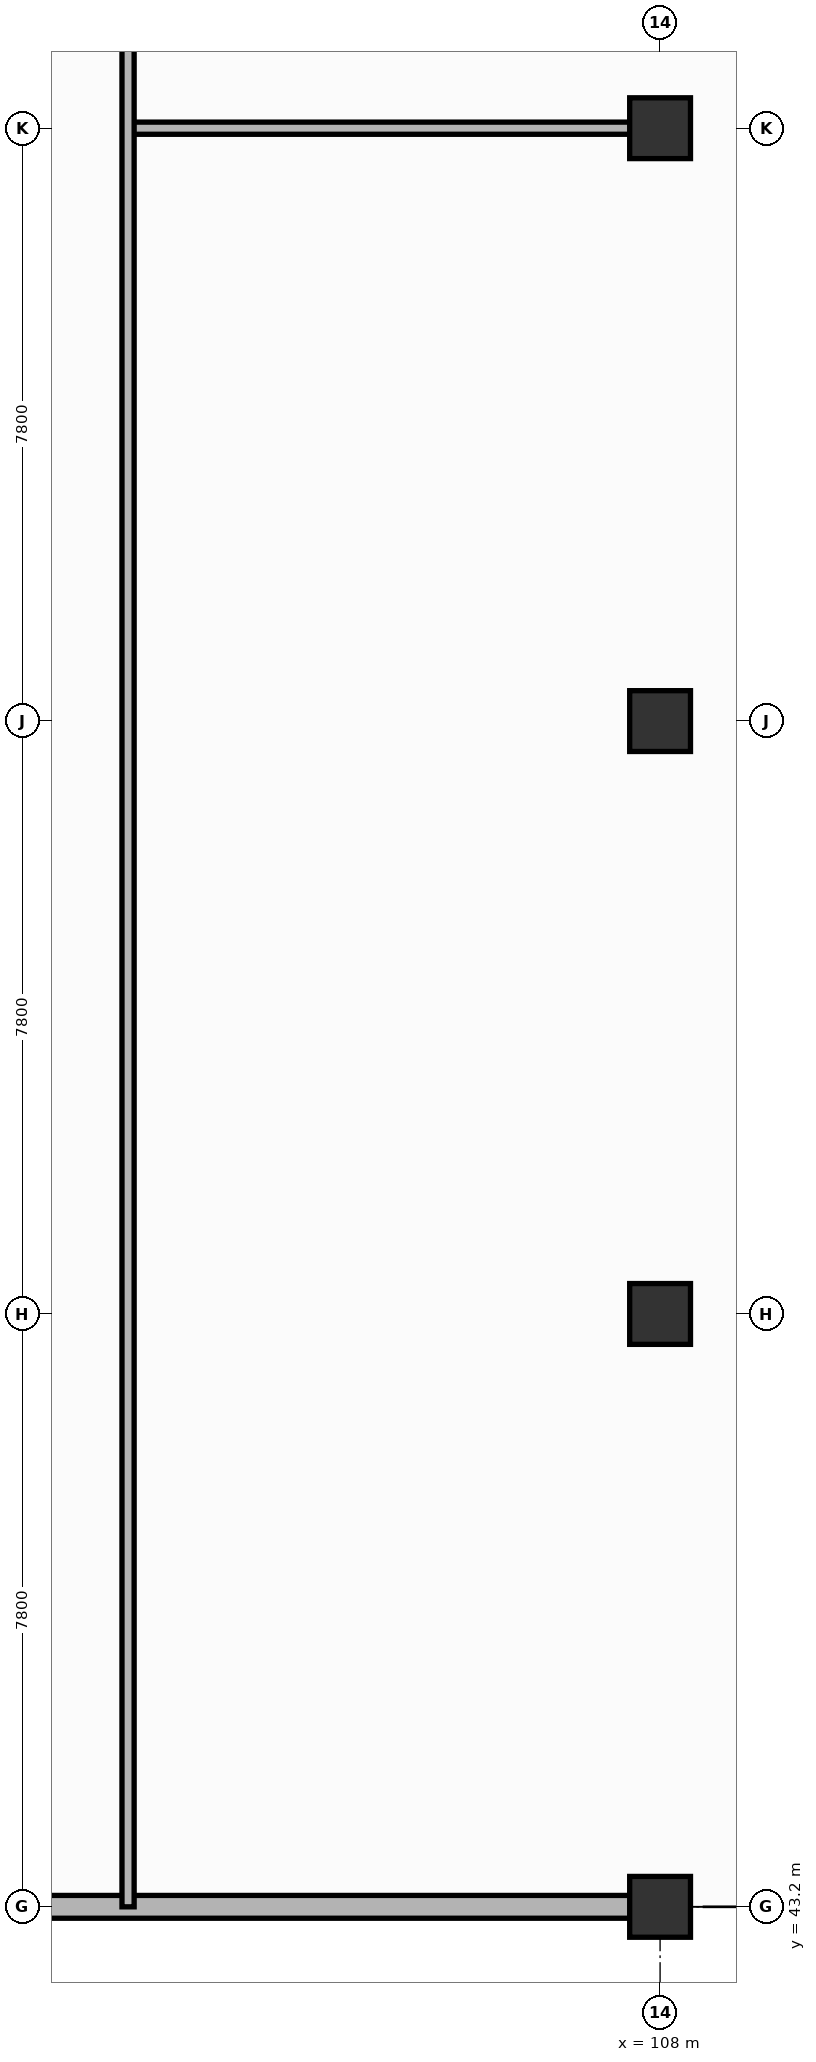
"""IFC4 building model, lengths in metres.
Left out: names, types, materials, properties, quantities, classifications, styles, units other than length and angle.
Written with IfcOpenShell. Run it as: python <this file> out.ifc"""

import sys

from ifc_helpers import new_model, si_unit, direction, frame, frame_2d, origin, origin_2d, place, context, subcontext, project, spatial, polyline, rectangle, outline, extrude, element, fill, save


model = new_model("IFC4")
c1 = context("Model", 3, precision=1e-05, world=origin(), true_north=direction((0.0, 1.0)))
c2 = subcontext(c1, "Body", "Model", "MODEL_VIEW")
j1 = project(units=[si_unit("LENGTHUNIT", "METRE"), si_unit("PLANEANGLEUNIT", "RADIAN")], contexts=[c1])
p1 = place(None, origin())
s1 = spatial("IfcSite", under=j1, at=p1, CompositionType="ELEMENT")
p2 = place(p1, origin())
s2 = spatial("IfcBuilding", under=s1, at=p2, CompositionType="ELEMENT")
p3 = place(p2, frame((0.0, 0.0, 5.1)))
s3 = spatial("IfcBuildingStorey", under=s2, at=p3, CompositionType="ELEMENT", Elevation=5.1)
for number, where, z_axis, x_axis in (
    (1, (108.0, 43.2, 0.0), (0.0, 0.0, 1.0), (1.0, 0.0, 0.0)),
    (2, (108.0, 51.0, 0.0), (0.0, 0.0, 1.0), (1.0, 0.0, 0.0)),
    (3, (108.0, 58.8, 0.0), (0.0, 0.0, 1.0), (1.0, 0.0, 0.0)),
    (4, (108.0, 66.6, 0.0), (0.0, 0.0, 1.0), (1.0, 0.0, 0.0)),
):
    element("IfcColumn", number, at=place(p3, frame(where, z_axis=z_axis, x_axis=x_axis)), inside=s3, PredefinedType="COLUMN", context=c2, shape_type="SweptSolid", body=[
        extrude(rectangle(XDim=0.8, YDim=0.8, at=origin_2d()), origin(), (0.0, 0.0, 1.0), 3.84),
    ])
p4 = place(p3, frame((90.0, 43.2, 0.0), z_axis=(0.0, 0.0, 1.0), x_axis=(1.0, 0.0, 0.0)))
e5 = element("IfcWall", 5, at=p4, inside=s3, PredefinedType="SOLIDWALL", context=c2, shape_type="SweptSolid", body=[
    extrude(outline(polyline([(0.0, 0.0), (18.0, 0.0), (18.0, 9.46), (0.0, 0.11), (0.0, 0.0)])), frame((0.0, 0.15, 0.0), z_axis=(0.0, -1.0, 0.0), x_axis=(1.0, 0.0, 0.0)), (0.0, 0.0, 1.0), 0.3),
])
p5 = place(p3, frame((101.0, 66.6, 0.0), z_axis=(0.0, 0.0, 1.0), x_axis=(1.0, 0.0, 0.0)))
e6 = element("IfcWall", 6, at=p5, inside=s3, PredefinedType="PARTITIONING", context=c2, shape_type="SweptSolid", body=[
    extrude(rectangle(XDim=7.0, YDim=0.16, at=frame_2d((3.5, 0.0))), origin(), (0.0, 0.0, 1.0), 3.55),
])
p6 = place(p5, frame((3.6, 0.0, 0.0)))
e7 = element("IfcOpeningElement", 7, at=p6, cuts=e6, PredefinedType="OPENING", context=c2, shape_type="SweptSolid", body=[
    extrude(rectangle(XDim=1.6, YDim=2.2, at=frame_2d((0.8, 1.1))), frame((0.0, 0.09, 0.0), z_axis=(0.0, -1.0, 0.0), x_axis=(1.0, 0.0, 0.0)), (0.0, 0.0, 1.0), 0.18),
])
p7 = place(p3, frame((101.0, 43.2, 0.0), z_axis=(0.0, 0.0, 1.0), x_axis=(0.0, 1.0, 0.0)))
e8 = element("IfcWall", 8, at=p7, inside=s3, PredefinedType="PARTITIONING", context=c2, shape_type="SweptSolid", body=[
    extrude(rectangle(XDim=31.2, YDim=0.16, at=frame_2d((15.6, 0.0))), origin(), (0.0, 0.0, 1.0), 3.55),
])
p8 = place(p6, origin())
e9 = element("IfcDoor", 9, at=p8, inside=s3, OperationType="DOUBLE_DOOR_SINGLE_SWING", PredefinedType="DOOR", context=c2, shape_type="SweptSolid", body=[
    extrude(rectangle(XDim=1.6, YDim=2.2, at=frame_2d((0.8, 1.1))), frame((0.0, 0.025, 0.0), z_axis=(0.0, -1.0, 0.0), x_axis=(1.0, 0.0, 0.0)), (0.0, 0.0, 1.0), 0.05),
])
fill(e7, e9)
save(model, sys.argv[1])
